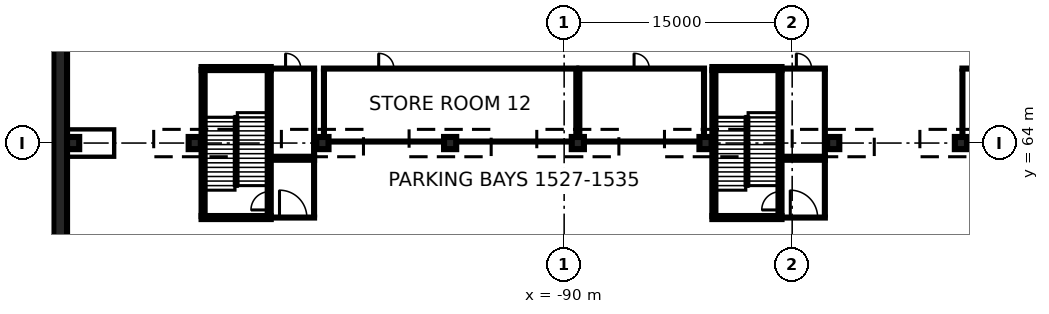
"""IFC4 building model, lengths in metres.
Left out: names, types, materials, properties, quantities, classifications, styles, units other than length and angle.
Written with IfcOpenShell. Run it as: python <this file> out.ifc"""

import sys

from ifc_helpers import new_model, si_unit, direction, frame, frame_2d, origin, origin_2d, place, context, subcontext, project, spatial, rectangle, extrude, element, fill, save


model = new_model("IFC4")
c1 = context("Model", 3, precision=1e-05, world=origin(), true_north=direction((0.0, 1.0)))
c2 = subcontext(c1, "Body", "Model", "MODEL_VIEW")
j1 = project(units=[si_unit("LENGTHUNIT", "METRE"), si_unit("PLANEANGLEUNIT", "RADIAN")], contexts=[c1])
p1 = place(None, origin())
s1 = spatial("IfcSite", under=j1, at=p1, CompositionType="ELEMENT")
p2 = place(p1, origin())
s2 = spatial("IfcBuilding", under=s1, at=p2, CompositionType="ELEMENT")
p3 = place(p2, frame((0.0, 0.0, -12.0)))
s3 = spatial("IfcBuildingStorey", under=s2, at=p3, CompositionType="ELEMENT", Elevation=-12.0)
p4 = place(p3, frame((-123.15, -80.0, 0.0), z_axis=(0.0, 0.0, 1.0), x_axis=(0.0, 1.0, 0.0)))
e1 = element("IfcWall", 1, at=p4, inside=s3, PredefinedType="USERDEFINED", context=c2, shape_type="SweptSolid", body=[
    extrude(rectangle(XDim=160.0, YDim=0.9, at=frame_2d((80.0, 0.0))), origin(), (0.0, 0.0, 1.0), 11.55),
])
for number, where, z_axis, x_axis in (
    (2, (-122.3, 64.0, 0.0), (0.0, 0.0, 1.0), (1.0, 0.0, 0.0)),
    (3, (-114.3, 64.0, 0.0), (0.0, 0.0, 1.0), (1.0, 0.0, 0.0)),
    (4, (-105.9, 64.0, 0.0), (0.0, 0.0, 1.0), (1.0, 0.0, 0.0)),
    (5, (-97.5, 64.0, 0.0), (0.0, 0.0, 1.0), (1.0, 0.0, 0.0)),
    (6, (-89.1, 64.0, 0.0), (0.0, 0.0, 1.0), (1.0, 0.0, 0.0)),
    (7, (-80.7, 64.0, 0.0), (0.0, 0.0, 1.0), (1.0, 0.0, 0.0)),
    (8, (-72.3, 64.0, 0.0), (0.0, 0.0, 1.0), (1.0, 0.0, 0.0)),
    (9, (-63.9, 64.0, 0.0), (0.0, 0.0, 1.0), (1.0, 0.0, 0.0)),
):
    element("IfcColumn", number, at=place(p3, frame(where, z_axis=z_axis, x_axis=x_axis)), inside=s3, PredefinedType="COLUMN", context=c2, shape_type="SweptSolid", body=[
        extrude(rectangle(XDim=0.8, YDim=0.8, at=origin_2d()), origin(), (0.0, 0.0, 1.0), 4.4),
    ])
p5 = place(p3, frame((-105.9, 64.1, 0.0), z_axis=(0.0, 0.0, 1.0), x_axis=(1.0, 0.0, 0.0)))
e10 = element("IfcWall", 10, at=p5, inside=s3, PredefinedType="PARTITIONING", context=c2, shape_type="SweptSolid", body=[
    extrude(rectangle(XDim=16.8, YDim=0.2, at=frame_2d((8.4, 0.0))), origin(), (0.0, 0.0, 1.0), 4.4),
])
p6 = place(p3, frame((-105.9, 68.9, 0.0), z_axis=(0.0, 0.0, 1.0), x_axis=(1.0, 0.0, 0.0)))
e11 = element("IfcWall", 11, at=p6, inside=s3, PredefinedType="PARTITIONING", context=c2, shape_type="SweptSolid", body=[
    extrude(rectangle(XDim=16.8, YDim=0.2, at=frame_2d((8.4, 0.0))), origin(), (0.0, 0.0, 1.0), 4.4),
])
p7 = place(p6, frame((3.7, 0.0, 0.0)))
e12 = element("IfcOpeningElement", 12, at=p7, cuts=e11, PredefinedType="OPENING", context=c2, shape_type="SweptSolid", body=[
    extrude(rectangle(XDim=1.0, YDim=2.1, at=frame_2d((0.5, 1.05))), frame((0.0, 0.11, 0.0), z_axis=(0.0, -1.0, 0.0), x_axis=(1.0, 0.0, 0.0)), (0.0, 0.0, 1.0), 0.22),
])
for number, where, z_axis, x_axis in (
    (13, (-105.8, 64.4, 0.0), (0.0, 0.0, 1.0), (0.0, 1.0, 0.0)),
    (14, (-89.2, 64.4, 0.0), (0.0, 0.0, 1.0), (0.0, 1.0, 0.0)),
):
    element("IfcWall", number, at=place(p3, frame(where, z_axis=z_axis, x_axis=x_axis)), inside=s3, PredefinedType="PARTITIONING", context=c2, shape_type="SweptSolid", body=[
        extrude(rectangle(XDim=4.4, YDim=0.2, at=frame_2d((2.2, 0.0))), origin(), (0.0, 0.0, 1.0), 4.4),
    ])
p8 = place(p3, frame((-89.1, 64.1, 0.0), z_axis=(0.0, 0.0, 1.0), x_axis=(1.0, 0.0, 0.0)))
e15 = element("IfcWall", 15, at=p8, inside=s3, PredefinedType="PARTITIONING", context=c2, shape_type="SweptSolid", body=[
    extrude(rectangle(XDim=8.4, YDim=0.2, at=frame_2d((4.2, 0.0))), origin(), (0.0, 0.0, 1.0), 4.4),
])
p9 = place(p3, frame((-89.1, 68.9, 0.0), z_axis=(0.0, 0.0, 1.0), x_axis=(1.0, 0.0, 0.0)))
e16 = element("IfcWall", 16, at=p9, inside=s3, PredefinedType="PARTITIONING", context=c2, shape_type="SweptSolid", body=[
    extrude(rectangle(XDim=8.4, YDim=0.2, at=frame_2d((4.2, 0.0))), origin(), (0.0, 0.0, 1.0), 4.4),
])
p10 = place(p9, frame((3.7, 0.0, 0.0)))
e17 = element("IfcOpeningElement", 17, at=p10, cuts=e16, PredefinedType="OPENING", context=c2, shape_type="SweptSolid", body=[
    extrude(rectangle(XDim=1.0, YDim=2.1, at=frame_2d((0.5, 1.05))), frame((0.0, 0.11, 0.0), z_axis=(0.0, -1.0, 0.0), x_axis=(1.0, 0.0, 0.0)), (0.0, 0.0, 1.0), 0.22),
])
for number, where, z_axis, x_axis in (
    (18, (-89.0, 64.4, 0.0), (0.0, 0.0, 1.0), (0.0, 1.0, 0.0)),
    (19, (-80.8, 64.4, 0.0), (0.0, 0.0, 1.0), (0.0, 1.0, 0.0)),
):
    element("IfcWall", number, at=place(p3, frame(where, z_axis=z_axis, x_axis=x_axis)), inside=s3, PredefinedType="PARTITIONING", context=c2, shape_type="SweptSolid", body=[
        extrude(rectangle(XDim=4.4, YDim=0.2, at=frame_2d((2.2, 0.0))), origin(), (0.0, 0.0, 1.0), 4.4),
    ])
p11 = place(p3, frame((-63.9, 64.1, 0.0), z_axis=(0.0, 0.0, 1.0), x_axis=(1.0, 0.0, 0.0)))
e20 = element("IfcWall", 20, at=p11, inside=s3, PredefinedType="PARTITIONING", context=c2, shape_type="SweptSolid", body=[
    extrude(rectangle(XDim=16.8, YDim=0.2, at=frame_2d((8.4, 0.0))), origin(), (0.0, 0.0, 1.0), 4.4),
])
p12 = place(p3, frame((-63.9, 68.9, 0.0), z_axis=(0.0, 0.0, 1.0), x_axis=(1.0, 0.0, 0.0)))
e21 = element("IfcWall", 21, at=p12, inside=s3, PredefinedType="PARTITIONING", context=c2, shape_type="SweptSolid", body=[
    extrude(rectangle(XDim=16.8, YDim=0.2, at=frame_2d((8.4, 0.0))), origin(), (0.0, 0.0, 1.0), 4.4),
])
p13 = place(p12, frame((3.7, 0.0, 0.0)))
e22 = element("IfcOpeningElement", 22, at=p13, cuts=e21, PredefinedType="OPENING", context=c2, shape_type="SweptSolid", body=[
    extrude(rectangle(XDim=1.0, YDim=2.1, at=frame_2d((0.5, 1.05))), frame((0.0, 0.11, 0.0), z_axis=(0.0, -1.0, 0.0), x_axis=(1.0, 0.0, 0.0)), (0.0, 0.0, 1.0), 0.22),
])
p14 = place(p3, frame((-63.8, 64.4, 0.0), z_axis=(0.0, 0.0, 1.0), x_axis=(0.0, 1.0, 0.0)))
e23 = element("IfcWall", 23, at=p14, inside=s3, PredefinedType="PARTITIONING", context=c2, shape_type="SweptSolid", body=[
    extrude(rectangle(XDim=4.4, YDim=0.2, at=frame_2d((2.2, 0.0))), origin(), (0.0, 0.0, 1.0), 4.4),
])
p15 = place(p3, frame((-109.3, 59.1, 0.0), z_axis=(0.0, 0.0, 1.0), x_axis=(1.0, 0.0, 0.0)))
e24 = element("IfcWall", 24, at=p15, inside=s3, PredefinedType="PARTITIONING", context=c2, shape_type="SweptSolid", body=[
    extrude(rectangle(XDim=2.95, YDim=0.2, at=frame_2d((1.475, 0.0))), origin(), (0.0, 0.0, 1.0), 4.4),
])
p16 = place(p15, frame((0.575, 0.0, 0.0)))
e25 = element("IfcOpeningElement", 25, at=p16, cuts=e24, PredefinedType="OPENING", context=c2, shape_type="SweptSolid", body=[
    extrude(rectangle(XDim=1.8, YDim=2.1, at=frame_2d((0.9, 1.05))), frame((0.0, 0.11, 0.0), z_axis=(0.0, -1.0, 0.0), x_axis=(1.0, 0.0, 0.0)), (0.0, 0.0, 1.0), 0.22),
])
p17 = place(p3, frame((-109.3, 62.9, 0.0), z_axis=(0.0, 0.0, 1.0), x_axis=(1.0, 0.0, 0.0)))
e26 = element("IfcWall", 26, at=p17, inside=s3, PredefinedType="PARTITIONING", context=c2, shape_type="SweptSolid", body=[
    extrude(rectangle(XDim=2.95, YDim=0.2, at=frame_2d((1.475, 0.0))), origin(), (0.0, 0.0, 1.0), 4.4),
])
p18 = place(p3, frame((-106.45, 59.2, 0.0), z_axis=(0.0, 0.0, 1.0), x_axis=(0.0, 1.0, 0.0)))
e27 = element("IfcWall", 27, at=p18, inside=s3, PredefinedType="PARTITIONING", context=c2, shape_type="SweptSolid", body=[
    extrude(rectangle(XDim=3.6, YDim=0.2, at=frame_2d((1.8, 0.0))), origin(), (0.0, 0.0, 1.0), 4.4),
])
p19 = place(p3, frame((-109.3, 63.1, 0.0), z_axis=(0.0, 0.0, 1.0), x_axis=(1.0, 0.0, 0.0)))
e28 = element("IfcWall", 28, at=p19, inside=s3, PredefinedType="PARTITIONING", context=c2, shape_type="SweptSolid", body=[
    extrude(rectangle(XDim=2.95, YDim=0.2, at=frame_2d((1.475, 0.0))), origin(), (0.0, 0.0, 1.0), 4.4),
])
p20 = place(p3, frame((-109.3, 68.9, 0.0), z_axis=(0.0, 0.0, 1.0), x_axis=(1.0, 0.0, 0.0)))
e29 = element("IfcWall", 29, at=p20, inside=s3, PredefinedType="PARTITIONING", context=c2, shape_type="SweptSolid", body=[
    extrude(rectangle(XDim=2.95, YDim=0.2, at=frame_2d((1.475, 0.0))), origin(), (0.0, 0.0, 1.0), 4.4),
])
p21 = place(p20, frame((0.975, 0.0, 0.0)))
e30 = element("IfcOpeningElement", 30, at=p21, cuts=e29, PredefinedType="OPENING", context=c2, shape_type="SweptSolid", body=[
    extrude(rectangle(XDim=1.0, YDim=2.1, at=frame_2d((0.5, 1.05))), frame((0.0, 0.11, 0.0), z_axis=(0.0, -1.0, 0.0), x_axis=(1.0, 0.0, 0.0)), (0.0, 0.0, 1.0), 0.22),
])
p22 = place(p3, frame((-106.45, 63.2, 0.0), z_axis=(0.0, 0.0, 1.0), x_axis=(0.0, 1.0, 0.0)))
e31 = element("IfcWall", 31, at=p22, inside=s3, PredefinedType="PARTITIONING", context=c2, shape_type="SweptSolid", body=[
    extrude(rectangle(XDim=5.6, YDim=0.2, at=frame_2d((2.8, 0.0))), origin(), (0.0, 0.0, 1.0), 4.4),
])
p23 = place(p3, frame((-75.7, 59.1, 0.0), z_axis=(0.0, 0.0, 1.0), x_axis=(1.0, 0.0, 0.0)))
e32 = element("IfcWall", 32, at=p23, inside=s3, PredefinedType="PARTITIONING", context=c2, shape_type="SweptSolid", body=[
    extrude(rectangle(XDim=2.95, YDim=0.2, at=frame_2d((1.475, 0.0))), origin(), (0.0, 0.0, 1.0), 4.4),
])
p24 = place(p23, frame((0.575, 0.0, 0.0)))
e33 = element("IfcOpeningElement", 33, at=p24, cuts=e32, PredefinedType="OPENING", context=c2, shape_type="SweptSolid", body=[
    extrude(rectangle(XDim=1.8, YDim=2.1, at=frame_2d((0.9, 1.05))), frame((0.0, 0.11, 0.0), z_axis=(0.0, -1.0, 0.0), x_axis=(1.0, 0.0, 0.0)), (0.0, 0.0, 1.0), 0.22),
])
p25 = place(p3, frame((-75.7, 62.9, 0.0), z_axis=(0.0, 0.0, 1.0), x_axis=(1.0, 0.0, 0.0)))
e34 = element("IfcWall", 34, at=p25, inside=s3, PredefinedType="PARTITIONING", context=c2, shape_type="SweptSolid", body=[
    extrude(rectangle(XDim=2.95, YDim=0.2, at=frame_2d((1.475, 0.0))), origin(), (0.0, 0.0, 1.0), 4.4),
])
p26 = place(p3, frame((-72.85, 59.2, 0.0), z_axis=(0.0, 0.0, 1.0), x_axis=(0.0, 1.0, 0.0)))
e35 = element("IfcWall", 35, at=p26, inside=s3, PredefinedType="PARTITIONING", context=c2, shape_type="SweptSolid", body=[
    extrude(rectangle(XDim=3.6, YDim=0.2, at=frame_2d((1.8, 0.0))), origin(), (0.0, 0.0, 1.0), 4.4),
])
p27 = place(p3, frame((-75.7, 63.1, 0.0), z_axis=(0.0, 0.0, 1.0), x_axis=(1.0, 0.0, 0.0)))
e36 = element("IfcWall", 36, at=p27, inside=s3, PredefinedType="PARTITIONING", context=c2, shape_type="SweptSolid", body=[
    extrude(rectangle(XDim=2.95, YDim=0.2, at=frame_2d((1.475, 0.0))), origin(), (0.0, 0.0, 1.0), 4.4),
])
p28 = place(p3, frame((-75.7, 68.9, 0.0), z_axis=(0.0, 0.0, 1.0), x_axis=(1.0, 0.0, 0.0)))
e37 = element("IfcWall", 37, at=p28, inside=s3, PredefinedType="PARTITIONING", context=c2, shape_type="SweptSolid", body=[
    extrude(rectangle(XDim=2.95, YDim=0.2, at=frame_2d((1.475, 0.0))), origin(), (0.0, 0.0, 1.0), 4.4),
])
p29 = place(p28, frame((0.975, 0.0, 0.0)))
e38 = element("IfcOpeningElement", 38, at=p29, cuts=e37, PredefinedType="OPENING", context=c2, shape_type="SweptSolid", body=[
    extrude(rectangle(XDim=1.0, YDim=2.1, at=frame_2d((0.5, 1.05))), frame((0.0, 0.11, 0.0), z_axis=(0.0, -1.0, 0.0), x_axis=(1.0, 0.0, 0.0)), (0.0, 0.0, 1.0), 0.22),
])
p30 = place(p3, frame((-72.85, 63.2, 0.0), z_axis=(0.0, 0.0, 1.0), x_axis=(0.0, 1.0, 0.0)))
e39 = element("IfcWall", 39, at=p30, inside=s3, PredefinedType="PARTITIONING", context=c2, shape_type="SweptSolid", body=[
    extrude(rectangle(XDim=5.6, YDim=0.2, at=frame_2d((2.8, 0.0))), origin(), (0.0, 0.0, 1.0), 4.4),
])
p31 = place(p3, frame((-113.75, 59.2, 0.0), z_axis=(0.0, 0.0, 1.0), x_axis=(0.0, 1.0, 0.0)))
e40 = element("IfcWall", 40, at=p31, inside=s3, PredefinedType="SOLIDWALL", context=c2, shape_type="SweptSolid", body=[
    extrude(rectangle(XDim=9.6, YDim=0.2, at=frame_2d((4.8, 0.0))), origin(), (0.0, 0.0, 1.0), 4.4),
])
p32 = place(p3, frame((-109.4, 59.2, 0.0), z_axis=(0.0, 0.0, 1.0), x_axis=(0.0, 1.0, 0.0)))
e41 = element("IfcWall", 41, at=p32, inside=s3, PredefinedType="SOLIDWALL", context=c2, shape_type="SweptSolid", body=[
    extrude(rectangle(XDim=9.6, YDim=0.2, at=frame_2d((4.8, 0.0))), origin(), (0.0, 0.0, 1.0), 4.4),
])
p33 = place(p32, frame((0.4, 0.0, 0.0)))
e42 = element("IfcOpeningElement", 42, at=p33, cuts=e41, PredefinedType="OPENING", context=c2, shape_type="SweptSolid", body=[
    extrude(rectangle(XDim=1.2, YDim=2.1, at=frame_2d((0.6, 1.05))), frame((0.0, 0.11, 0.0), z_axis=(0.0, -1.0, 0.0), x_axis=(1.0, 0.0, 0.0)), (0.0, 0.0, 1.0), 0.22),
])
for number, where, z_axis, x_axis in (
    (43, (-109.3, 59.1, 0.0), (0.0, 0.0, 1.0), (-1.0, 0.0, 0.0)),
    (44, (-113.85, 68.9, 0.0), (0.0, 0.0, 1.0), (1.0, 0.0, 0.0)),
):
    element("IfcWall", number, at=place(p3, frame(where, z_axis=z_axis, x_axis=x_axis)), inside=s3, PredefinedType="SOLIDWALL", context=c2, shape_type="SweptSolid", body=[
        extrude(rectangle(XDim=4.55, YDim=0.2, at=frame_2d((2.275, 0.0))), origin(), (0.0, 0.0, 1.0), 4.4),
    ])
p34 = place(p3, frame((-80.15, 59.2, 0.0), z_axis=(0.0, 0.0, 1.0), x_axis=(0.0, 1.0, 0.0)))
e45 = element("IfcWall", 45, at=p34, inside=s3, PredefinedType="SOLIDWALL", context=c2, shape_type="SweptSolid", body=[
    extrude(rectangle(XDim=9.6, YDim=0.2, at=frame_2d((4.8, 0.0))), origin(), (0.0, 0.0, 1.0), 4.4),
])
p35 = place(p3, frame((-75.8, 59.2, 0.0), z_axis=(0.0, 0.0, 1.0), x_axis=(0.0, 1.0, 0.0)))
e46 = element("IfcWall", 46, at=p35, inside=s3, PredefinedType="SOLIDWALL", context=c2, shape_type="SweptSolid", body=[
    extrude(rectangle(XDim=9.6, YDim=0.2, at=frame_2d((4.8, 0.0))), origin(), (0.0, 0.0, 1.0), 4.4),
])
p36 = place(p35, frame((0.4, 0.0, 0.0)))
e47 = element("IfcOpeningElement", 47, at=p36, cuts=e46, PredefinedType="OPENING", context=c2, shape_type="SweptSolid", body=[
    extrude(rectangle(XDim=1.2, YDim=2.1, at=frame_2d((0.6, 1.05))), frame((0.0, 0.11, 0.0), z_axis=(0.0, -1.0, 0.0), x_axis=(1.0, 0.0, 0.0)), (0.0, 0.0, 1.0), 0.22),
])
for number, where, z_axis, x_axis in (
    (48, (-75.7, 59.1, 0.0), (0.0, 0.0, 1.0), (-1.0, 0.0, 0.0)),
    (49, (-80.25, 68.9, 0.0), (0.0, 0.0, 1.0), (1.0, 0.0, 0.0)),
):
    element("IfcWall", number, at=place(p3, frame(where, z_axis=z_axis, x_axis=x_axis)), inside=s3, PredefinedType="SOLIDWALL", context=c2, shape_type="SweptSolid", body=[
        extrude(rectangle(XDim=4.55, YDim=0.2, at=frame_2d((2.275, 0.0))), origin(), (0.0, 0.0, 1.0), 4.4),
    ])
p37 = place(p7, origin())
e50 = element("IfcDoor", 50, at=p37, inside=s3, OperationType="SINGLE_SWING_LEFT", PredefinedType="DOOR", context=c2, shape_type="SweptSolid", body=[
    extrude(rectangle(XDim=1.0, YDim=2.1, at=frame_2d((0.5, 1.05))), frame((0.0, 0.025, 0.0), z_axis=(0.0, -1.0, 0.0), x_axis=(1.0, 0.0, 0.0)), (0.0, 0.0, 1.0), 0.05),
])
fill(e12, e50)
p38 = place(p10, origin())
e51 = element("IfcDoor", 51, at=p38, inside=s3, OperationType="SINGLE_SWING_LEFT", PredefinedType="DOOR", context=c2, shape_type="SweptSolid", body=[
    extrude(rectangle(XDim=1.0, YDim=2.1, at=frame_2d((0.5, 1.05))), frame((0.0, 0.025, 0.0), z_axis=(0.0, -1.0, 0.0), x_axis=(1.0, 0.0, 0.0)), (0.0, 0.0, 1.0), 0.05),
])
fill(e17, e51)
p39 = place(p16, origin())
e52 = element("IfcDoor", 52, at=p39, inside=s3, OperationType="DOUBLE_DOOR_SINGLE_SWING", PredefinedType="DOOR", context=c2, shape_type="SweptSolid", body=[
    extrude(rectangle(XDim=1.8, YDim=2.1, at=frame_2d((0.9, 1.05))), frame((0.0, 0.025, 0.0), z_axis=(0.0, -1.0, 0.0), x_axis=(1.0, 0.0, 0.0)), (0.0, 0.0, 1.0), 0.05),
])
fill(e25, e52)
p40 = place(p21, origin())
e53 = element("IfcDoor", 53, at=p40, inside=s3, OperationType="SINGLE_SWING_LEFT", PredefinedType="DOOR", context=c2, shape_type="SweptSolid", body=[
    extrude(rectangle(XDim=1.0, YDim=2.1, at=frame_2d((0.5, 1.05))), frame((0.0, 0.025, 0.0), z_axis=(0.0, -1.0, 0.0), x_axis=(1.0, 0.0, 0.0)), (0.0, 0.0, 1.0), 0.05),
])
fill(e30, e53)
p41 = place(p24, origin())
e54 = element("IfcDoor", 54, at=p41, inside=s3, OperationType="DOUBLE_DOOR_SINGLE_SWING", PredefinedType="DOOR", context=c2, shape_type="SweptSolid", body=[
    extrude(rectangle(XDim=1.8, YDim=2.1, at=frame_2d((0.9, 1.05))), frame((0.0, 0.025, 0.0), z_axis=(0.0, -1.0, 0.0), x_axis=(1.0, 0.0, 0.0)), (0.0, 0.0, 1.0), 0.05),
])
fill(e33, e54)
p42 = place(p29, origin())
e55 = element("IfcDoor", 55, at=p42, inside=s3, OperationType="SINGLE_SWING_LEFT", PredefinedType="DOOR", context=c2, shape_type="SweptSolid", body=[
    extrude(rectangle(XDim=1.0, YDim=2.1, at=frame_2d((0.5, 1.05))), frame((0.0, 0.025, 0.0), z_axis=(0.0, -1.0, 0.0), x_axis=(1.0, 0.0, 0.0)), (0.0, 0.0, 1.0), 0.05),
])
fill(e38, e55)
p43 = place(p33, origin())
e56 = element("IfcDoor", 56, at=p43, inside=s3, OperationType="SINGLE_SWING_LEFT", PredefinedType="DOOR", context=c2, shape_type="SweptSolid", body=[
    extrude(rectangle(XDim=1.2, YDim=2.1, at=frame_2d((0.6, 1.05))), frame((0.0, 0.025, 0.0), z_axis=(0.0, -1.0, 0.0), x_axis=(1.0, 0.0, 0.0)), (0.0, 0.0, 1.0), 0.05),
])
fill(e42, e56)
p44 = place(p36, origin())
e57 = element("IfcDoor", 57, at=p44, inside=s3, OperationType="SINGLE_SWING_LEFT", PredefinedType="DOOR", context=c2, shape_type="SweptSolid", body=[
    extrude(rectangle(XDim=1.2, YDim=2.1, at=frame_2d((0.6, 1.05))), frame((0.0, 0.025, 0.0), z_axis=(0.0, -1.0, 0.0), x_axis=(1.0, 0.0, 0.0)), (0.0, 0.0, 1.0), 0.05),
])
fill(e47, e57)
save(model, sys.argv[1])
